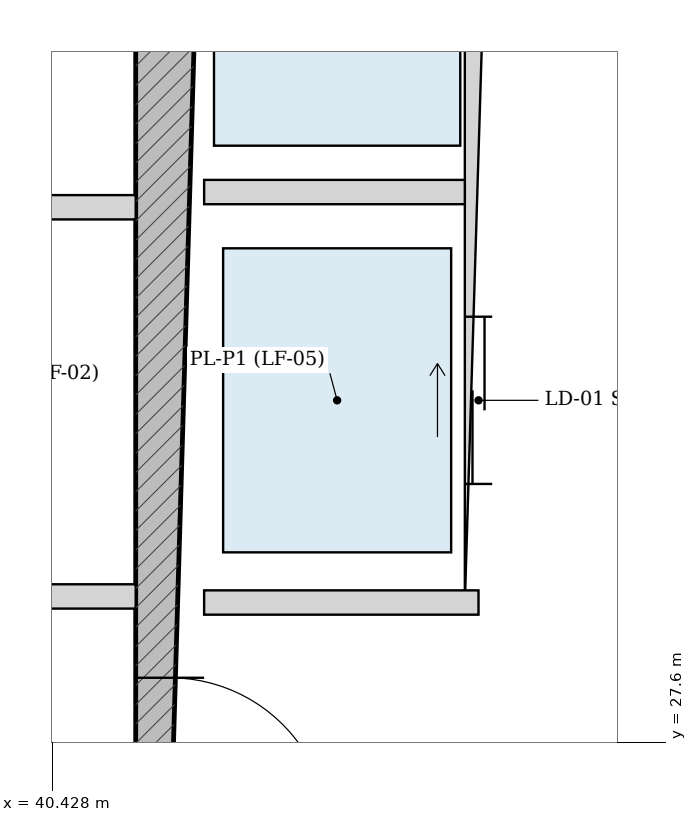
"""IFC4 building model, lengths in metres.
Left out: names, types, materials, properties, quantities, classifications, styles, units other than length and angle.
Written with IfcOpenShell. Run it as: python <this file> out.ifc"""

import sys

from ifc_helpers import new_model, si_unit, direction, frame, frame_2d, origin, place, context, subcontext, project, spatial, rectangle, extrude, source, transform, mapped, element, fill, save


model = new_model("IFC4")
c1 = context("Model", 3, precision=1e-05, world=origin(), true_north=direction((-0.2419218956, 0.970295726276)))
c2 = subcontext(c1, "Body", "Model", "MODEL_VIEW")
j1 = project(units=[si_unit("LENGTHUNIT", "METRE"), si_unit("PLANEANGLEUNIT", "RADIAN")], contexts=[c1])
p1 = place(None, origin())
s1 = spatial("IfcSite", under=j1, at=p1, CompositionType="ELEMENT")
p2 = place(p1, origin())
s2 = spatial("IfcBuilding", under=s1, at=p2, CompositionType="ELEMENT")
p3 = place(p2, frame((0.0, 0.0, 14.4)))
s3 = spatial("IfcBuildingStorey", under=s2, at=p3, CompositionType="ELEMENT", Elevation=14.4)
p4 = place(p3, frame((41.2, 19.175, 0.0), z_axis=(0.0, 0.0, 1.0), x_axis=(0.0, 1.0, 0.0)))
e1 = element("IfcWall", 1, at=p4, inside=s3, PredefinedType="SHEAR", context=c2, shape_type="SweptSolid", body=[
    extrude(rectangle(XDim=15.25, YDim=0.45, at=frame_2d((7.625, 0.0))), origin(), (0.0, 0.0, 1.0), 4.05),
])
p5 = place(p4, frame((7.8, 0.0, 0.0)))
e2 = element("IfcOpeningElement", 2, at=p5, cuts=e1, PredefinedType="OPENING", context=c2, shape_type="SweptSolid", body=[
    extrude(rectangle(XDim=1.05, YDim=2.15, at=frame_2d((0.525, 1.075))), frame((0.0, 0.235, 0.0), z_axis=(0.0, -1.0, 0.0), x_axis=(1.0, 0.0, 0.0)), (0.0, 0.0, 1.0), 0.47),
])
p6 = place(p3, frame((43.23, 28.52, 0.0), z_axis=(0.0, 0.0, 1.0), x_axis=(0.0, 1.0, 0.0)))
e3 = element("IfcWall", 3, at=p6, inside=s3, PredefinedType="PARTITIONING", context=c2, shape_type="SweptSolid", body=[
    extrude(rectangle(XDim=5.905, YDim=0.18, at=frame_2d((2.953, 0.0))), origin(), (0.0, 0.0, 1.0), 4.05),
])
p7 = place(p6, frame((3.655, 0.0, 0.0)))
e4 = element("IfcOpeningElement", 4, at=p7, cuts=e3, PredefinedType="OPENING", context=c2, shape_type="SweptSolid", body=[
    extrude(rectangle(XDim=1.15, YDim=2.2, at=frame_2d((0.575, 1.1))), frame((0.0, 0.1, 0.0), z_axis=(0.0, -1.0, 0.0), x_axis=(1.0, 0.0, 0.0)), (0.0, 0.0, 1.0), 0.2),
])
p8 = place(p6, frame((0.78, 0.0, 0.0)))
e5 = element("IfcOpeningElement", 5, at=p8, cuts=e3, PredefinedType="OPENING", context=c2, shape_type="SweptSolid", body=[
    extrude(rectangle(XDim=1.1, YDim=2.2, at=frame_2d((0.55, 1.1))), frame((0.0, 0.1, 0.0), z_axis=(0.0, -1.0, 0.0), x_axis=(1.0, 0.0, 0.0)), (0.0, 0.0, 1.0), 0.2),
])
p9 = place(p3, frame((41.425, 31.22, 0.0), z_axis=(0.0, 0.0, 1.0), x_axis=(1.0, 0.0, 0.0)))
e6 = element("IfcWall", 6, at=p9, inside=s3, PredefinedType="PARTITIONING", context=c2, shape_type="SweptSolid", body=[
    extrude(rectangle(XDim=1.715, YDim=0.16, at=frame_2d((0.857, 0.0))), origin(), (0.0, 0.0, 1.0), 4.05),
])
p10 = place(p3, frame((41.425, 28.52, 0.0), z_axis=(0.0, 0.0, 1.0), x_axis=(1.0, 0.0, 0.0)))
e7 = element("IfcWall", 7, at=p10, inside=s3, PredefinedType="PARTITIONING", context=c2, shape_type="SweptSolid", body=[
    extrude(rectangle(XDim=1.805, YDim=0.16, at=frame_2d((0.902, 0.0))), origin(), (0.0, 0.0, 1.0), 4.05),
])
p11 = place(p3, frame((35.025, 28.56, 0.0), z_axis=(0.0, 0.0, 1.0), x_axis=(1.0, 0.0, 0.0)))
e8 = element("IfcWall", 8, at=p11, inside=s3, PredefinedType="PARTITIONING", context=c2, shape_type="SweptSolid", body=[
    extrude(rectangle(XDim=5.95, YDim=0.16, at=frame_2d((2.975, 0.0))), origin(), (0.0, 0.0, 1.0), 4.05),
])
p12 = place(p11, frame((0.76, 0.0, 0.0)))
e9 = element("IfcOpeningElement", 9, at=p12, cuts=e8, PredefinedType="OPENING", context=c2, shape_type="SweptSolid", body=[
    extrude(rectangle(XDim=1.1, YDim=2.2, at=frame_2d((0.55, 1.1))), frame((0.0, 0.09, 0.0), z_axis=(0.0, -1.0, 0.0), x_axis=(1.0, 0.0, 0.0)), (0.0, 0.0, 1.0), 0.18),
])
p13 = place(p11, frame((2.425, 0.0, 0.0)))
e10 = element("IfcOpeningElement", 10, at=p13, cuts=e8, PredefinedType="OPENING", context=c2, shape_type="SweptSolid", body=[
    extrude(rectangle(XDim=1.1, YDim=2.2, at=frame_2d((0.55, 1.1))), frame((0.0, 0.09, 0.0), z_axis=(0.0, -1.0, 0.0), x_axis=(1.0, 0.0, 0.0)), (0.0, 0.0, 1.0), 0.18),
])
p14 = place(p11, frame((4.09, 0.0, 0.0)))
e11 = element("IfcOpeningElement", 11, at=p14, cuts=e8, PredefinedType="OPENING", context=c2, shape_type="SweptSolid", body=[
    extrude(rectangle(XDim=1.1, YDim=2.2, at=frame_2d((0.55, 1.1))), frame((0.0, 0.09, 0.0), z_axis=(0.0, -1.0, 0.0), x_axis=(1.0, 0.0, 0.0)), (0.0, 0.0, 1.0), 0.18),
])
p15 = place(p3, frame((35.025, 31.12, 0.0), z_axis=(0.0, 0.0, 1.0), x_axis=(1.0, 0.0, 0.0)))
e12 = element("IfcWall", 12, at=p15, inside=s3, PredefinedType="PARTITIONING", context=c2, shape_type="SweptSolid", body=[
    extrude(rectangle(XDim=5.95, YDim=0.16, at=frame_2d((2.975, 0.0))), origin(), (0.0, 0.0, 1.0), 4.05),
])
m1 = source(origin(), c2, "Body", "SweptSolid", [
    extrude(rectangle(XDim=1.05, YDim=2.15, at=frame_2d((0.525, 1.075))), frame((0.0, 0.025, 0.0), z_axis=(0.0, -1.0, 0.0), x_axis=(1.0, 0.0, 0.0)), (0.0, 0.0, 1.0), 0.05),
])
p16 = place(p5, frame((1.05, 0.0, 0.0), z_axis=(0.0, 0.0, 1.0), x_axis=(-1.0, 0.0, 0.0)))
e13 = element("IfcDoor", 13, at=p16, inside=s3, OperationType="SINGLE_SWING_RIGHT", PredefinedType="DOOR", context=c2, shape_type="MappedRepresentation", body=[
    mapped(m1, transform((0.0, 0.0, 0.0), scale=1.0)),
])
fill(e2, e13)
m2 = source(origin(), c2, "Body", "SweptSolid", [
    extrude(rectangle(XDim=1.1, YDim=2.2, at=frame_2d((0.55, 1.1))), frame((0.0, 0.025, 0.0), z_axis=(0.0, -1.0, 0.0), x_axis=(1.0, 0.0, 0.0)), (0.0, 0.0, 1.0), 0.05),
])
p17 = place(p8, origin())
e14 = element("IfcDoor", 14, at=p17, inside=s3, OperationType="DOUBLE_DOOR_SLIDING", PredefinedType="DOOR", context=c2, shape_type="MappedRepresentation", body=[
    mapped(m2, transform((0.0, 0.0, 0.0), scale=1.0)),
])
fill(e5, e14)
save(model, sys.argv[1])
